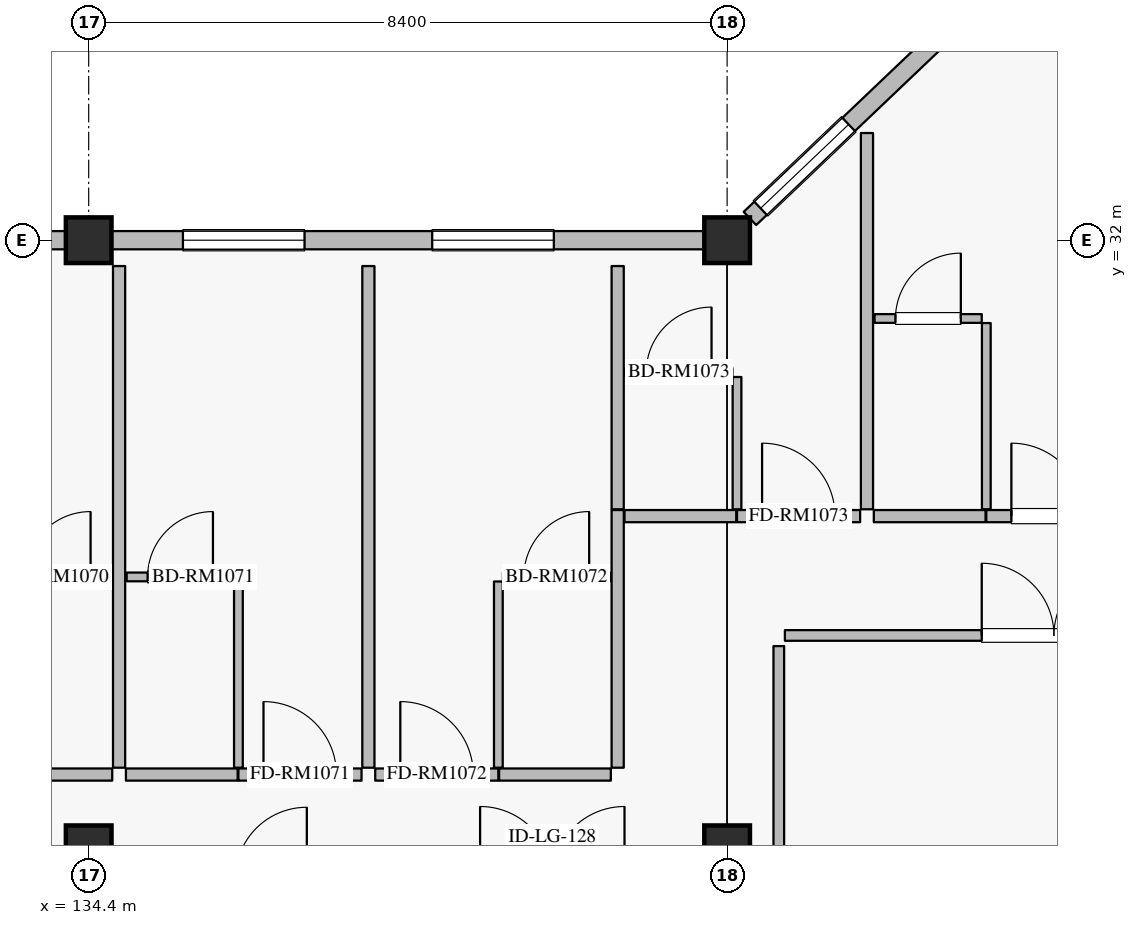
"""IFC4 building model, lengths in metres.
Left out: names, types, materials, properties, quantities, classifications, styles, units other than length and angle.
Written with IfcOpenShell. Run it as: python <this file> out.ifc"""

import sys

from ifc_helpers import new_model, si_unit, direction, frame, frame_2d, origin, origin_2d, place, context, subcontext, project, spatial, rectangle, extrude, element, fill, save


model = new_model("IFC4")
c1 = context("Model", 3, precision=1e-05, world=origin(), true_north=direction((0.0, 1.0)))
c2 = subcontext(c1, "Body", "Model", "MODEL_VIEW")
j1 = project(units=[si_unit("LENGTHUNIT", "METRE"), si_unit("PLANEANGLEUNIT", "RADIAN")], contexts=[c1])
p1 = place(None, origin())
s1 = spatial("IfcSite", under=j1, at=p1, CompositionType="ELEMENT")
p2 = place(p1, origin())
s2 = spatial("IfcBuilding", under=s1, at=p2, CompositionType="ELEMENT")
p3 = place(p2, frame((0.0, 0.0, 39.6)))
s3 = spatial("IfcBuildingStorey", under=s2, at=p3, CompositionType="ELEMENT", Elevation=39.6)
for number, where, z_axis, x_axis in (
    (1, (134.4, 32.0, 0.0), (0.0, 0.0, 1.0), (1.0, 0.0, 0.0)),
    (2, (142.8, 32.0, 0.0), (0.0, 0.0, 1.0), (1.0, 0.0, 0.0)),
    (3, (134.4, 24.0, 0.0), (0.0, 0.0, 1.0), (1.0, 0.0, 0.0)),
    (4, (142.8, 24.0, 0.0), (0.0, 0.0, 1.0), (1.0, 0.0, 0.0)),
):
    element("IfcColumn", number, at=place(p3, frame(where, z_axis=z_axis, x_axis=x_axis)), inside=s3, PredefinedType="COLUMN", context=c2, shape_type="SweptSolid", body=[
        extrude(rectangle(XDim=0.6, YDim=0.6, at=origin_2d()), origin(), (0.0, 0.0, 1.0), 3.6),
    ])
p4 = place(p3, frame((126.3, 32.0, 0.0), z_axis=(0.0, 0.0, 1.0), x_axis=(1.0, 0.0, 0.0)))
e5 = element("IfcWall", 5, at=p4, inside=s3, PredefinedType="SOLIDWALL", context=c2, shape_type="SweptSolid", body=[
    extrude(rectangle(XDim=7.8, YDim=0.24, at=frame_2d((3.9, 0.0))), origin(), (0.0, 0.0, 1.0), 2.89),
])
p5 = place(p4, frame((0.12, 0.0, 0.8)))
e6 = element("IfcOpeningElement", 6, at=p5, cuts=e5, PredefinedType="OPENING", context=c2, shape_type="SweptSolid", body=[
    extrude(rectangle(XDim=1.6, YDim=1.6, at=frame_2d((0.8, 0.8))), frame((0.0, 0.13, 0.0), z_axis=(0.0, -1.0, 0.0), x_axis=(1.0, 0.0, 0.0)), (0.0, 0.0, 1.0), 0.26),
])
p6 = place(p4, frame((2.78, 0.0, 0.8)))
e7 = element("IfcOpeningElement", 7, at=p6, cuts=e5, PredefinedType="OPENING", context=c2, shape_type="SweptSolid", body=[
    extrude(rectangle(XDim=1.6, YDim=1.6, at=frame_2d((0.8, 0.8))), frame((0.0, 0.13, 0.0), z_axis=(0.0, -1.0, 0.0), x_axis=(1.0, 0.0, 0.0)), (0.0, 0.0, 1.0), 0.26),
])
p7 = place(p4, frame((5.76, 0.0, 0.8)))
e8 = element("IfcOpeningElement", 8, at=p7, cuts=e5, PredefinedType="OPENING", context=c2, shape_type="SweptSolid", body=[
    extrude(rectangle(XDim=1.6, YDim=1.6, at=frame_2d((0.8, 0.8))), frame((0.0, 0.13, 0.0), z_axis=(0.0, -1.0, 0.0), x_axis=(1.0, 0.0, 0.0)), (0.0, 0.0, 1.0), 0.26),
])
p8 = place(p3, frame((134.7, 32.0, 0.0), z_axis=(0.0, 0.0, 1.0), x_axis=(1.0, 0.0, 0.0)))
e9 = element("IfcWall", 9, at=p8, inside=s3, PredefinedType="SOLIDWALL", context=c2, shape_type="SweptSolid", body=[
    extrude(rectangle(XDim=7.8, YDim=0.24, at=frame_2d((3.9, 0.0))), origin(), (0.0, 0.0, 1.0), 2.94),
])
p9 = place(p8, frame((0.94, 0.0, 0.8)))
e10 = element("IfcOpeningElement", 10, at=p9, cuts=e9, PredefinedType="OPENING", context=c2, shape_type="SweptSolid", body=[
    extrude(rectangle(XDim=1.6, YDim=1.6, at=frame_2d((0.8, 0.8))), frame((0.0, 0.13, 0.0), z_axis=(0.0, -1.0, 0.0), x_axis=(1.0, 0.0, 0.0)), (0.0, 0.0, 1.0), 0.26),
])
p10 = place(p8, frame((4.22, 0.0, 0.8)))
e11 = element("IfcOpeningElement", 11, at=p10, cuts=e9, PredefinedType="OPENING", context=c2, shape_type="SweptSolid", body=[
    extrude(rectangle(XDim=1.6, YDim=1.6, at=frame_2d((0.8, 0.8))), frame((0.0, 0.13, 0.0), z_axis=(0.0, -1.0, 0.0), x_axis=(1.0, 0.0, 0.0)), (0.0, 0.0, 1.0), 0.26),
])
p11 = place(p3, frame((143.1, 32.286, 0.0), z_axis=(0.0, 0.0, 1.0), x_axis=(0.724145477467, 0.689647248573, 0.0)))
e12 = element("IfcWall", 12, at=p11, inside=s3, PredefinedType="SOLIDWALL", context=c2, shape_type="SweptSolid", body=[
    extrude(rectangle(XDim=10.771, YDim=0.24, at=frame_2d((5.385, 0.0))), origin(), (0.0, 0.0, 1.0), 2.94),
])
p12 = place(p11, frame((0.194, 0.0, 0.8)))
e13 = element("IfcOpeningElement", 13, at=p12, cuts=e12, PredefinedType="OPENING", context=c2, shape_type="SweptSolid", body=[
    extrude(rectangle(XDim=1.6, YDim=1.6, at=frame_2d((0.8, 0.8))), frame((0.0, 0.13, 0.0), z_axis=(0.0, -1.0, 0.0), x_axis=(1.0, 0.0, 0.0)), (0.0, 0.0, 1.0), 0.26),
])
p13 = place(p11, frame((3.591, 0.0, 0.8)))
e14 = element("IfcOpeningElement", 14, at=p13, cuts=e12, PredefinedType="OPENING", context=c2, shape_type="SweptSolid", body=[
    extrude(rectangle(XDim=1.6, YDim=1.6, at=frame_2d((0.8, 0.8))), frame((0.0, 0.13, 0.0), z_axis=(0.0, -1.0, 0.0), x_axis=(1.0, 0.0, 0.0)), (0.0, 0.0, 1.0), 0.26),
])
p14 = place(p11, frame((7.983, 0.0, 0.8)))
e15 = element("IfcOpeningElement", 15, at=p14, cuts=e12, PredefinedType="OPENING", context=c2, shape_type="SweptSolid", body=[
    extrude(rectangle(XDim=1.6, YDim=1.6, at=frame_2d((0.8, 0.8))), frame((0.0, 0.13, 0.0), z_axis=(0.0, -1.0, 0.0), x_axis=(1.0, 0.0, 0.0)), (0.0, 0.0, 1.0), 0.26),
])
p15 = place(p3, frame((133.24, 24.97, 0.0), z_axis=(0.0, 0.0, 1.0), x_axis=(1.0, 0.0, 0.0)))
e16 = element("IfcWall", 16, at=p15, inside=s3, PredefinedType="PARTITIONING", context=c2, shape_type="SweptSolid", body=[
    extrude(rectangle(XDim=1.47, YDim=0.16, at=frame_2d((0.735, 0.0))), origin(), (0.0, 0.0, 1.0), 3.335),
])
p16 = place(p3, frame((133.29, 27.57, 0.0), z_axis=(0.0, 0.0, 1.0), x_axis=(1.0, 0.0, 0.0)))
e17 = element("IfcWall", 17, at=p16, inside=s3, PredefinedType="PARTITIONING", context=c2, shape_type="SweptSolid", body=[
    extrude(rectangle(XDim=1.41, YDim=0.115, at=frame_2d((0.705, 0.0))), origin(), (0.0, 0.0, 1.0), 3.335),
])
p17 = place(p16, frame((0.275, 0.0, 0.0)))
e18 = element("IfcOpeningElement", 18, at=p17, cuts=e17, PredefinedType="OPENING", context=c2, shape_type="SweptSolid", body=[
    extrude(rectangle(XDim=0.86, YDim=2.12, at=frame_2d((0.43, 1.06))), frame((0.0, 0.067, 0.0), z_axis=(0.0, -1.0, 0.0), x_axis=(1.0, 0.0, 0.0)), (0.0, 0.0, 1.0), 0.135),
])
p18 = place(p3, frame((134.89, 24.97, 0.0), z_axis=(0.0, 0.0, 1.0), x_axis=(1.0, 0.0, 0.0)))
e19 = element("IfcWall", 19, at=p18, inside=s3, PredefinedType="PARTITIONING", context=c2, shape_type="SweptSolid", body=[
    extrude(rectangle(XDim=1.47, YDim=0.16, at=frame_2d((0.735, 0.0))), origin(), (0.0, 0.0, 1.0), 3.335),
])
p19 = place(p3, frame((136.37, 24.97, 0.0), z_axis=(0.0, 0.0, 1.0), x_axis=(1.0, 0.0, 0.0)))
e20 = element("IfcWall", 20, at=p19, inside=s3, PredefinedType="PARTITIONING", context=c2, shape_type="SweptSolid", body=[
    extrude(rectangle(XDim=1.62, YDim=0.16, at=frame_2d((0.81, 0.0))), origin(), (0.0, 0.0, 1.0), 3.335),
])
p20 = place(p19, frame((0.33, 0.0, 0.0)))
e21 = element("IfcOpeningElement", 21, at=p20, cuts=e20, PredefinedType="OPENING", context=c2, shape_type="SweptSolid", body=[
    extrude(rectangle(XDim=0.96, YDim=2.2, at=frame_2d((0.48, 1.1))), frame((0.0, 0.09, 0.0), z_axis=(0.0, -1.0, 0.0), x_axis=(1.0, 0.0, 0.0)), (0.0, 0.0, 1.0), 0.18),
])
p21 = place(p3, frame((136.37, 25.06, 0.0), z_axis=(0.0, 0.0, 1.0), x_axis=(0.0, 1.0, 0.0)))
e22 = element("IfcWall", 22, at=p21, inside=s3, PredefinedType="PARTITIONING", context=c2, shape_type="SweptSolid", body=[
    extrude(rectangle(XDim=2.45, YDim=0.115, at=frame_2d((1.225, 0.0))), origin(), (0.0, 0.0, 1.0), 3.335),
])
p22 = place(p3, frame((134.9, 27.57, 0.0), z_axis=(0.0, 0.0, 1.0), x_axis=(1.0, 0.0, 0.0)))
e23 = element("IfcWall", 23, at=p22, inside=s3, PredefinedType="PARTITIONING", context=c2, shape_type="SweptSolid", body=[
    extrude(rectangle(XDim=1.41, YDim=0.115, at=frame_2d((0.705, 0.0))), origin(), (0.0, 0.0, 1.0), 3.335),
])
p23 = place(p22, frame((0.275, 0.0, 0.0)))
e24 = element("IfcOpeningElement", 24, at=p23, cuts=e23, PredefinedType="OPENING", context=c2, shape_type="SweptSolid", body=[
    extrude(rectangle(XDim=0.86, YDim=2.12, at=frame_2d((0.43, 1.06))), frame((0.0, 0.067, 0.0), z_axis=(0.0, -1.0, 0.0), x_axis=(1.0, 0.0, 0.0)), (0.0, 0.0, 1.0), 0.135),
])
p24 = place(p3, frame((134.8, 25.06, 0.0), z_axis=(0.0, 0.0, 1.0), x_axis=(0.0, 1.0, 0.0)))
e25 = element("IfcWall", 25, at=p24, inside=s3, PredefinedType="PARTITIONING", context=c2, shape_type="SweptSolid", body=[
    extrude(rectangle(XDim=6.6, YDim=0.16, at=frame_2d((3.3, 0.0))), origin(), (0.0, 0.0, 1.0), 3.335),
])
p25 = place(p3, frame((138.17, 24.97, 0.0), z_axis=(0.0, 0.0, 1.0), x_axis=(1.0, 0.0, 0.0)))
e26 = element("IfcWall", 26, at=p25, inside=s3, PredefinedType="PARTITIONING", context=c2, shape_type="SweptSolid", body=[
    extrude(rectangle(XDim=1.62, YDim=0.16, at=frame_2d((0.81, 0.0))), origin(), (0.0, 0.0, 1.0), 3.335),
])
p26 = place(p25, frame((0.33, 0.0, 0.0)))
e27 = element("IfcOpeningElement", 27, at=p26, cuts=e26, PredefinedType="OPENING", context=c2, shape_type="SweptSolid", body=[
    extrude(rectangle(XDim=0.96, YDim=2.2, at=frame_2d((0.48, 1.1))), frame((0.0, 0.09, 0.0), z_axis=(0.0, -1.0, 0.0), x_axis=(1.0, 0.0, 0.0)), (0.0, 0.0, 1.0), 0.18),
])
p27 = place(p3, frame((139.8, 24.97, 0.0), z_axis=(0.0, 0.0, 1.0), x_axis=(1.0, 0.0, 0.0)))
e28 = element("IfcWall", 28, at=p27, inside=s3, PredefinedType="PARTITIONING", context=c2, shape_type="SweptSolid", body=[
    extrude(rectangle(XDim=1.47, YDim=0.16, at=frame_2d((0.735, 0.0))), origin(), (0.0, 0.0, 1.0), 3.335),
])
p28 = place(p3, frame((139.79, 25.06, 0.0), z_axis=(0.0, 0.0, 1.0), x_axis=(0.0, 1.0, 0.0)))
e29 = element("IfcWall", 29, at=p28, inside=s3, PredefinedType="PARTITIONING", context=c2, shape_type="SweptSolid", body=[
    extrude(rectangle(XDim=2.45, YDim=0.115, at=frame_2d((1.225, 0.0))), origin(), (0.0, 0.0, 1.0), 3.335),
])
p29 = place(p3, frame((139.85, 27.57, 0.0), z_axis=(0.0, 0.0, 1.0), x_axis=(1.0, 0.0, 0.0)))
e30 = element("IfcWall", 30, at=p29, inside=s3, PredefinedType="PARTITIONING", context=c2, shape_type="SweptSolid", body=[
    extrude(rectangle(XDim=1.41, YDim=0.115, at=frame_2d((0.705, 0.0))), origin(), (0.0, 0.0, 1.0), 3.335),
])
p30 = place(p29, frame((0.275, 0.0, 0.0)))
e31 = element("IfcOpeningElement", 31, at=p30, cuts=e30, PredefinedType="OPENING", context=c2, shape_type="SweptSolid", body=[
    extrude(rectangle(XDim=0.86, YDim=2.12, at=frame_2d((0.43, 1.06))), frame((0.0, 0.067, 0.0), z_axis=(0.0, -1.0, 0.0), x_axis=(1.0, 0.0, 0.0)), (0.0, 0.0, 1.0), 0.135),
])
p31 = place(p3, frame((138.08, 25.06, 0.0), z_axis=(0.0, 0.0, 1.0), x_axis=(0.0, 1.0, 0.0)))
e32 = element("IfcWall", 32, at=p31, inside=s3, PredefinedType="PARTITIONING", context=c2, shape_type="SweptSolid", body=[
    extrude(rectangle(XDim=6.6, YDim=0.16, at=frame_2d((3.3, 0.0))), origin(), (0.0, 0.0, 1.0), 3.335),
])
p32 = place(p3, frame((141.36, 25.06, 0.0), z_axis=(0.0, 0.0, 1.0), x_axis=(0.0, 1.0, 0.0)))
e33 = element("IfcWall", 33, at=p32, inside=s3, PredefinedType="PARTITIONING", context=c2, shape_type="SweptSolid", body=[
    extrude(rectangle(XDim=3.39, YDim=0.16, at=frame_2d((1.695, 0.0))), origin(), (0.0, 0.0, 1.0), 3.335),
])
p33 = place(p3, frame((141.45, 28.37, 0.0), z_axis=(0.0, 0.0, 1.0), x_axis=(1.0, 0.0, 0.0)))
e34 = element("IfcWall", 34, at=p33, inside=s3, PredefinedType="PARTITIONING", context=c2, shape_type="SweptSolid", body=[
    extrude(rectangle(XDim=1.47, YDim=0.16, at=frame_2d((0.735, 0.0))), origin(), (0.0, 0.0, 1.0), 3.335),
])
p34 = place(p3, frame((142.93, 28.37, 0.0), z_axis=(0.0, 0.0, 1.0), x_axis=(1.0, 0.0, 0.0)))
e35 = element("IfcWall", 35, at=p34, inside=s3, PredefinedType="PARTITIONING", context=c2, shape_type="SweptSolid", body=[
    extrude(rectangle(XDim=1.62, YDim=0.16, at=frame_2d((0.81, 0.0))), origin(), (0.0, 0.0, 1.0), 3.335),
])
p35 = place(p34, frame((0.33, 0.0, 0.0)))
e36 = element("IfcOpeningElement", 36, at=p35, cuts=e35, PredefinedType="OPENING", context=c2, shape_type="SweptSolid", body=[
    extrude(rectangle(XDim=0.96, YDim=2.2, at=frame_2d((0.48, 1.1))), frame((0.0, 0.09, 0.0), z_axis=(0.0, -1.0, 0.0), x_axis=(1.0, 0.0, 0.0)), (0.0, 0.0, 1.0), 0.18),
])
p36 = place(p3, frame((142.93, 28.46, 0.0), z_axis=(0.0, 0.0, 1.0), x_axis=(0.0, 1.0, 0.0)))
e37 = element("IfcWall", 37, at=p36, inside=s3, PredefinedType="PARTITIONING", context=c2, shape_type="SweptSolid", body=[
    extrude(rectangle(XDim=1.74, YDim=0.115, at=frame_2d((0.87, 0.0))), origin(), (0.0, 0.0, 1.0), 2.74),
])
p37 = place(p3, frame((141.46, 30.26, 0.0), z_axis=(0.0, 0.0, 1.0), x_axis=(1.0, 0.0, 0.0)))
e38 = element("IfcWall", 38, at=p37, inside=s3, PredefinedType="PARTITIONING", context=c2, shape_type="SweptSolid", body=[
    extrude(rectangle(XDim=1.41, YDim=0.115, at=frame_2d((0.705, 0.0))), origin(), (0.0, 0.0, 1.0), 3.335),
])
p38 = place(p37, frame((0.275, 0.0, 0.0)))
e39 = element("IfcOpeningElement", 39, at=p38, cuts=e38, PredefinedType="OPENING", context=c2, shape_type="SweptSolid", body=[
    extrude(rectangle(XDim=0.86, YDim=2.12, at=frame_2d((0.43, 1.06))), frame((0.0, 0.067, 0.0), z_axis=(0.0, -1.0, 0.0), x_axis=(1.0, 0.0, 0.0)), (0.0, 0.0, 1.0), 0.135),
])
p39 = place(p3, frame((141.36, 28.46, 0.0), z_axis=(0.0, 0.0, 1.0), x_axis=(0.0, 1.0, 0.0)))
e40 = element("IfcWall", 40, at=p39, inside=s3, PredefinedType="PARTITIONING", context=c2, shape_type="SweptSolid", body=[
    extrude(rectangle(XDim=3.2, YDim=0.16, at=frame_2d((1.6, 0.0))), origin(), (0.0, 0.0, 1.0), 3.335),
])
p40 = place(p3, frame((144.73, 28.37, 0.0), z_axis=(0.0, 0.0, 1.0), x_axis=(1.0, 0.0, 0.0)))
e41 = element("IfcWall", 41, at=p40, inside=s3, PredefinedType="PARTITIONING", context=c2, shape_type="SweptSolid", body=[
    extrude(rectangle(XDim=1.47, YDim=0.16, at=frame_2d((0.735, 0.0))), origin(), (0.0, 0.0, 1.0), 3.335),
])
p41 = place(p3, frame((146.21, 28.37, 0.0), z_axis=(0.0, 0.0, 1.0), x_axis=(1.0, 0.0, 0.0)))
e42 = element("IfcWall", 42, at=p41, inside=s3, PredefinedType="PARTITIONING", context=c2, shape_type="SweptSolid", body=[
    extrude(rectangle(XDim=1.62, YDim=0.16, at=frame_2d((0.81, 0.0))), origin(), (0.0, 0.0, 1.0), 3.335),
])
p42 = place(p41, frame((0.33, 0.0, 0.0)))
e43 = element("IfcOpeningElement", 43, at=p42, cuts=e42, PredefinedType="OPENING", context=c2, shape_type="SweptSolid", body=[
    extrude(rectangle(XDim=0.96, YDim=2.2, at=frame_2d((0.48, 1.1))), frame((0.0, 0.09, 0.0), z_axis=(0.0, -1.0, 0.0), x_axis=(1.0, 0.0, 0.0)), (0.0, 0.0, 1.0), 0.18),
])
p43 = place(p3, frame((146.21, 28.46, 0.0), z_axis=(0.0, 0.0, 1.0), x_axis=(0.0, 1.0, 0.0)))
e44 = element("IfcWall", 44, at=p43, inside=s3, PredefinedType="PARTITIONING", context=c2, shape_type="SweptSolid", body=[
    extrude(rectangle(XDim=2.45, YDim=0.115, at=frame_2d((1.225, 0.0))), origin(), (0.0, 0.0, 1.0), 3.335),
])
p44 = place(p3, frame((144.74, 30.97, 0.0), z_axis=(0.0, 0.0, 1.0), x_axis=(1.0, 0.0, 0.0)))
e45 = element("IfcWall", 45, at=p44, inside=s3, PredefinedType="PARTITIONING", context=c2, shape_type="SweptSolid", body=[
    extrude(rectangle(XDim=1.41, YDim=0.115, at=frame_2d((0.705, 0.0))), origin(), (0.0, 0.0, 1.0), 3.335),
])
p45 = place(p44, frame((0.275, 0.0, 0.0)))
e46 = element("IfcOpeningElement", 46, at=p45, cuts=e45, PredefinedType="OPENING", context=c2, shape_type="SweptSolid", body=[
    extrude(rectangle(XDim=0.86, YDim=2.12, at=frame_2d((0.43, 1.06))), frame((0.0, 0.067, 0.0), z_axis=(0.0, -1.0, 0.0), x_axis=(1.0, 0.0, 0.0)), (0.0, 0.0, 1.0), 0.135),
])
p46 = place(p3, frame((144.64, 28.46, 0.0), z_axis=(0.0, 0.0, 1.0), x_axis=(0.0, 1.0, 0.0)))
e47 = element("IfcWall", 47, at=p46, inside=s3, PredefinedType="PARTITIONING", context=c2, shape_type="SweptSolid", body=[
    extrude(rectangle(XDim=4.95, YDim=0.16, at=frame_2d((2.475, 0.0))), origin(), (0.0, 0.0, 1.0), 3.335),
])
p47 = place(p3, frame((143.56, 26.8, 0.0), z_axis=(0.0, 0.0, 1.0), x_axis=(1.0, 0.0, 0.0)))
e48 = element("IfcWall", 48, at=p47, inside=s3, PredefinedType="PARTITIONING", context=c2, shape_type="SweptSolid", body=[
    extrude(rectangle(XDim=7.08, YDim=0.14, at=frame_2d((3.54, 0.0))), origin(), (0.0, 0.0, 1.0), 3.335),
])
p48 = place(p47, frame((2.59, 0.0, 0.0)))
e49 = element("IfcOpeningElement", 49, at=p48, cuts=e48, PredefinedType="OPENING", context=c2, shape_type="SweptSolid", body=[
    extrude(rectangle(XDim=1.9, YDim=2.4, at=frame_2d((0.95, 1.2))), frame((0.0, 0.08, 0.0), z_axis=(0.0, -1.0, 0.0), x_axis=(1.0, 0.0, 0.0)), (0.0, 0.0, 1.0), 0.16),
])
p49 = place(p3, frame((143.48, 23.45, 0.0), z_axis=(0.0, 0.0, 1.0), x_axis=(0.0, 1.0, 0.0)))
e50 = element("IfcWall", 50, at=p49, inside=s3, PredefinedType="PARTITIONING", context=c2, shape_type="SweptSolid", body=[
    extrude(rectangle(XDim=3.21, YDim=0.14, at=frame_2d((1.605, 0.0))), origin(), (0.0, 0.0, 1.0), 3.335),
])
p50 = place(p9, origin())
e51 = element("IfcWindow", 51, at=p50, inside=s3, PartitioningType="SINGLE_PANEL", PredefinedType="WINDOW", context=c2, shape_type="SweptSolid", body=[
    extrude(rectangle(XDim=1.6, YDim=1.6, at=frame_2d((0.8, 0.8))), frame((0.0, 0.03, 0.0), z_axis=(0.0, -1.0, 0.0), x_axis=(1.0, 0.0, 0.0)), (0.0, 0.0, 1.0), 0.06),
])
fill(e10, e51)
p51 = place(p10, origin())
e52 = element("IfcWindow", 52, at=p51, inside=s3, PartitioningType="SINGLE_PANEL", PredefinedType="WINDOW", context=c2, shape_type="SweptSolid", body=[
    extrude(rectangle(XDim=1.6, YDim=1.6, at=frame_2d((0.8, 0.8))), frame((0.0, 0.03, 0.0), z_axis=(0.0, -1.0, 0.0), x_axis=(1.0, 0.0, 0.0)), (0.0, 0.0, 1.0), 0.06),
])
fill(e11, e52)
p52 = place(p12, origin())
e53 = element("IfcWindow", 53, at=p52, inside=s3, PartitioningType="SINGLE_PANEL", PredefinedType="WINDOW", context=c2, shape_type="SweptSolid", body=[
    extrude(rectangle(XDim=1.6, YDim=1.6, at=frame_2d((0.8, 0.8))), frame((0.0, 0.03, 0.0), z_axis=(0.0, -1.0, 0.0), x_axis=(1.0, 0.0, 0.0)), (0.0, 0.0, 1.0), 0.06),
])
fill(e13, e53)
p53 = place(p17, origin())
e54 = element("IfcDoor", 54, at=p53, inside=s3, OperationType="SINGLE_SWING_RIGHT", PredefinedType="DOOR", context=c2, shape_type="SweptSolid", body=[
    extrude(rectangle(XDim=0.86, YDim=2.12, at=frame_2d((0.43, 1.06))), frame((0.0, 0.025, 0.0), z_axis=(0.0, -1.0, 0.0), x_axis=(1.0, 0.0, 0.0)), (0.0, 0.0, 1.0), 0.05),
])
fill(e18, e54)
p54 = place(p20, origin())
e55 = element("IfcDoor", 55, at=p54, inside=s3, OperationType="SINGLE_SWING_LEFT", PredefinedType="DOOR", context=c2, shape_type="SweptSolid", body=[
    extrude(rectangle(XDim=0.96, YDim=2.2, at=frame_2d((0.48, 1.1))), frame((0.0, 0.025, 0.0), z_axis=(0.0, -1.0, 0.0), x_axis=(1.0, 0.0, 0.0)), (0.0, 0.0, 1.0), 0.05),
])
fill(e21, e55)
p55 = place(p23, origin())
e56 = element("IfcDoor", 56, at=p55, inside=s3, OperationType="SINGLE_SWING_RIGHT", PredefinedType="DOOR", context=c2, shape_type="SweptSolid", body=[
    extrude(rectangle(XDim=0.86, YDim=2.12, at=frame_2d((0.43, 1.06))), frame((0.0, 0.025, 0.0), z_axis=(0.0, -1.0, 0.0), x_axis=(1.0, 0.0, 0.0)), (0.0, 0.0, 1.0), 0.05),
])
fill(e24, e56)
p56 = place(p26, origin())
e57 = element("IfcDoor", 57, at=p56, inside=s3, OperationType="SINGLE_SWING_LEFT", PredefinedType="DOOR", context=c2, shape_type="SweptSolid", body=[
    extrude(rectangle(XDim=0.96, YDim=2.2, at=frame_2d((0.48, 1.1))), frame((0.0, 0.025, 0.0), z_axis=(0.0, -1.0, 0.0), x_axis=(1.0, 0.0, 0.0)), (0.0, 0.0, 1.0), 0.05),
])
fill(e27, e57)
p57 = place(p30, origin())
e58 = element("IfcDoor", 58, at=p57, inside=s3, OperationType="SINGLE_SWING_RIGHT", PredefinedType="DOOR", context=c2, shape_type="SweptSolid", body=[
    extrude(rectangle(XDim=0.86, YDim=2.12, at=frame_2d((0.43, 1.06))), frame((0.0, 0.025, 0.0), z_axis=(0.0, -1.0, 0.0), x_axis=(1.0, 0.0, 0.0)), (0.0, 0.0, 1.0), 0.05),
])
fill(e31, e58)
p58 = place(p35, origin())
e59 = element("IfcDoor", 59, at=p58, inside=s3, OperationType="SINGLE_SWING_LEFT", PredefinedType="DOOR", context=c2, shape_type="SweptSolid", body=[
    extrude(rectangle(XDim=0.96, YDim=2.2, at=frame_2d((0.48, 1.1))), frame((0.0, 0.025, 0.0), z_axis=(0.0, -1.0, 0.0), x_axis=(1.0, 0.0, 0.0)), (0.0, 0.0, 1.0), 0.05),
])
fill(e36, e59)
p59 = place(p38, origin())
e60 = element("IfcDoor", 60, at=p59, inside=s3, OperationType="SINGLE_SWING_RIGHT", PredefinedType="DOOR", context=c2, shape_type="SweptSolid", body=[
    extrude(rectangle(XDim=0.86, YDim=2.12, at=frame_2d((0.43, 1.06))), frame((0.0, 0.025, 0.0), z_axis=(0.0, -1.0, 0.0), x_axis=(1.0, 0.0, 0.0)), (0.0, 0.0, 1.0), 0.05),
])
fill(e39, e60)
p60 = place(p42, origin())
e61 = element("IfcDoor", 61, at=p60, inside=s3, OperationType="SINGLE_SWING_LEFT", PredefinedType="DOOR", context=c2, shape_type="SweptSolid", body=[
    extrude(rectangle(XDim=0.96, YDim=2.2, at=frame_2d((0.48, 1.1))), frame((0.0, 0.025, 0.0), z_axis=(0.0, -1.0, 0.0), x_axis=(1.0, 0.0, 0.0)), (0.0, 0.0, 1.0), 0.05),
])
fill(e43, e61)
p61 = place(p45, origin())
e62 = element("IfcDoor", 62, at=p61, inside=s3, OperationType="SINGLE_SWING_RIGHT", PredefinedType="DOOR", context=c2, shape_type="SweptSolid", body=[
    extrude(rectangle(XDim=0.86, YDim=2.12, at=frame_2d((0.43, 1.06))), frame((0.0, 0.025, 0.0), z_axis=(0.0, -1.0, 0.0), x_axis=(1.0, 0.0, 0.0)), (0.0, 0.0, 1.0), 0.05),
])
fill(e46, e62)
p62 = place(p48, origin())
e63 = element("IfcDoor", 63, at=p62, inside=s3, OperationType="DOUBLE_DOOR_SINGLE_SWING", PredefinedType="DOOR", context=c2, shape_type="SweptSolid", body=[
    extrude(rectangle(XDim=1.9, YDim=2.4, at=frame_2d((0.95, 1.2))), frame((0.0, 0.025, 0.0), z_axis=(0.0, -1.0, 0.0), x_axis=(1.0, 0.0, 0.0)), (0.0, 0.0, 1.0), 0.05),
])
fill(e49, e63)
save(model, sys.argv[1])
